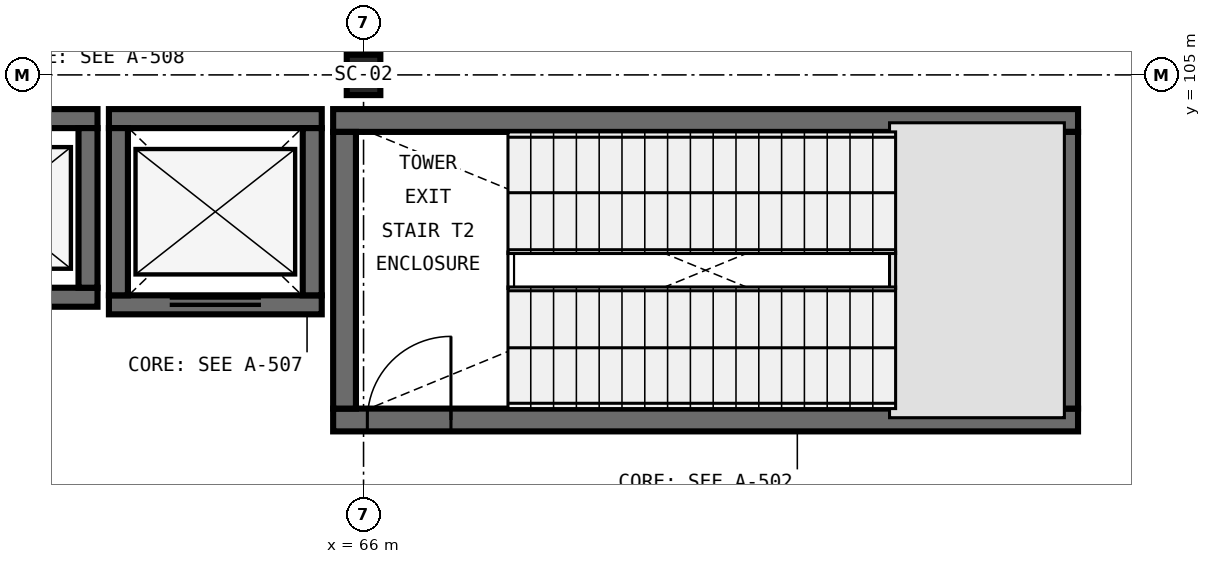
"""IFC4 building model, lengths in metres.
Left out: names, types, materials, properties, quantities, classifications, styles, units other than length and angle.
Written with IfcOpenShell. Run it as: python <this file> out.ifc"""

import sys

from ifc_helpers import new_model, si_unit, direction, frame, frame_2d, origin, origin_2d, place, context, subcontext, project, spatial, rectangle, i_section, extrude, element, fill, save


model = new_model("IFC4")
c1 = context("Model", 3, precision=1e-05, world=origin(), true_north=direction((0.0, 1.0)))
c2 = subcontext(c1, "Body", "Model", "MODEL_VIEW")
j1 = project(units=[si_unit("LENGTHUNIT", "METRE"), si_unit("PLANEANGLEUNIT", "RADIAN")], contexts=[c1])
p1 = place(None, origin())
s1 = spatial("IfcSite", under=j1, at=p1, CompositionType="ELEMENT")
p2 = place(p1, origin())
s2 = spatial("IfcBuilding", under=s1, at=p2, CompositionType="ELEMENT")
p3 = place(p2, frame((0.0, 0.0, 12.0)))
s3 = spatial("IfcBuildingStorey", under=s2, at=p3, CompositionType="ELEMENT", Elevation=12.0)
p4 = place(p3, frame((66.0, 105.0, 0.0), z_axis=(0.0, 0.0, 1.0), x_axis=(1.0, 0.0, 0.0)))
e1 = element("IfcColumn", 1, at=p4, inside=s3, PredefinedType="COLUMN", context=c2, shape_type="SweptSolid", body=[
    extrude(i_section(OverallWidth=0.442, OverallDepth=0.531, WebThickness=0.066, FlangeThickness=0.106, FilletRadius=0.031, at=origin_2d()), origin(), (0.0, 0.0, 1.0), 6.0),
])
p5 = place(p3, frame((65.6, 100.46, 0.0), z_axis=(0.0, 0.0, 1.0), x_axis=(1.0, 0.0, 0.0)))
e2 = element("IfcWall", 2, at=p5, inside=s3, PredefinedType="SHEAR", context=c2, shape_type="SweptSolid", body=[
    extrude(rectangle(XDim=9.8, YDim=0.3, at=frame_2d((4.9, 0.0))), origin(), (0.0, 0.0, 1.0), 6.0),
])
p6 = place(p5, frame((0.45, 0.0, 0.0)))
e3 = element("IfcOpeningElement", 3, at=p6, cuts=e2, PredefinedType="OPENING", context=c2, shape_type="SweptSolid", body=[
    extrude(rectangle(XDim=1.1, YDim=2.2, at=frame_2d((0.55, 1.1))), frame((0.0, 0.165, 0.0), z_axis=(0.0, -1.0, 0.0), x_axis=(1.0, 0.0, 0.0)), (0.0, 0.0, 1.0), 0.33),
])
p7 = place(p3, frame((75.4, 104.4, 0.0), z_axis=(0.0, 0.0, 1.0), x_axis=(-1.0, 0.0, 0.0)))
e4 = element("IfcWall", 4, at=p7, inside=s3, PredefinedType="SHEAR", context=c2, shape_type="SweptSolid", body=[
    extrude(rectangle(XDim=9.8, YDim=0.3, at=frame_2d((4.9, 0.0))), origin(), (0.0, 0.0, 1.0), 6.0),
])
for number, where, z_axis, x_axis in (
    (5, (65.75, 104.25, 0.0), (0.0, 0.0, 1.0), (0.0, -1.0, 0.0)),
    (6, (75.25, 100.61, 0.0), (0.0, 0.0, 1.0), (0.0, 1.0, 0.0)),
):
    element("IfcWall", number, at=place(p3, frame(where, z_axis=z_axis, x_axis=x_axis)), inside=s3, PredefinedType="SHEAR", context=c2, shape_type="SweptSolid", body=[
        extrude(rectangle(XDim=3.64, YDim=0.3, at=frame_2d((1.82, 0.0))), origin(), (0.0, 0.0, 1.0), 6.0),
    ])
p8 = place(p3, frame((62.65, 101.975, 0.0), z_axis=(0.0, 0.0, 1.0), x_axis=(1.0, 0.0, 0.0)))
e7 = element("IfcWall", 7, at=p8, inside=s3, PredefinedType="SHEAR", context=c2, shape_type="SweptSolid", body=[
    extrude(rectangle(XDim=2.8, YDim=0.25, at=frame_2d((1.4, 0.0))), origin(), (0.0, 0.0, 1.0), 6.0),
])
p9 = place(p8, frame((0.8, 0.0, 0.0)))
e8 = element("IfcOpeningElement", 8, at=p9, cuts=e7, PredefinedType="OPENING", context=c2, shape_type="SweptSolid", body=[
    extrude(rectangle(XDim=1.2, YDim=2.2, at=frame_2d((0.6, 1.1))), frame((0.0, 0.14, 0.0), z_axis=(0.0, -1.0, 0.0), x_axis=(1.0, 0.0, 0.0)), (0.0, 0.0, 1.0), 0.28),
])
p10 = place(p3, frame((65.45, 104.425, 0.0), z_axis=(0.0, 0.0, 1.0), x_axis=(-1.0, 0.0, 0.0)))
e9 = element("IfcWall", 9, at=p10, inside=s3, PredefinedType="SHEAR", context=c2, shape_type="SweptSolid", body=[
    extrude(rectangle(XDim=2.8, YDim=0.25, at=frame_2d((1.4, 0.0))), origin(), (0.0, 0.0, 1.0), 6.0),
])
for number, where, z_axis, x_axis in (
    (10, (62.775, 104.3, 0.0), (0.0, 0.0, 1.0), (0.0, -1.0, 0.0)),
    (11, (65.325, 102.1, 0.0), (0.0, 0.0, 1.0), (0.0, 1.0, 0.0)),
):
    element("IfcWall", number, at=place(p3, frame(where, z_axis=z_axis, x_axis=x_axis)), inside=s3, PredefinedType="SHEAR", context=c2, shape_type="SweptSolid", body=[
        extrude(rectangle(XDim=2.2, YDim=0.25, at=frame_2d((1.1, 0.0))), origin(), (0.0, 0.0, 1.0), 6.0),
    ])
p11 = place(p3, frame((59.8, 102.075, 0.0), z_axis=(0.0, 0.0, 1.0), x_axis=(1.0, 0.0, 0.0)))
e12 = element("IfcWall", 12, at=p11, inside=s3, PredefinedType="SHEAR", context=c2, shape_type="SweptSolid", body=[
    extrude(rectangle(XDim=2.7, YDim=0.25, at=frame_2d((1.35, 0.0))), origin(), (0.0, 0.0, 1.0), 6.0),
])
p12 = place(p11, frame((0.8, 0.0, 0.0)))
e13 = element("IfcOpeningElement", 13, at=p12, cuts=e12, PredefinedType="OPENING", context=c2, shape_type="SweptSolid", body=[
    extrude(rectangle(XDim=1.1, YDim=2.2, at=frame_2d((0.55, 1.1))), frame((0.0, 0.14, 0.0), z_axis=(0.0, -1.0, 0.0), x_axis=(1.0, 0.0, 0.0)), (0.0, 0.0, 1.0), 0.28),
])
p13 = place(p3, frame((62.5, 104.425, 0.0), z_axis=(0.0, 0.0, 1.0), x_axis=(-1.0, 0.0, 0.0)))
e14 = element("IfcWall", 14, at=p13, inside=s3, PredefinedType="SHEAR", context=c2, shape_type="SweptSolid", body=[
    extrude(rectangle(XDim=2.7, YDim=0.25, at=frame_2d((1.35, 0.0))), origin(), (0.0, 0.0, 1.0), 6.0),
])
p14 = place(p3, frame((62.375, 102.2, 0.0), z_axis=(0.0, 0.0, 1.0), x_axis=(0.0, 1.0, 0.0)))
e15 = element("IfcWall", 15, at=p14, inside=s3, PredefinedType="SHEAR", context=c2, shape_type="SweptSolid", body=[
    extrude(rectangle(XDim=2.1, YDim=0.25, at=frame_2d((1.05, 0.0))), origin(), (0.0, 0.0, 1.0), 6.0),
])
p15 = place(p6, origin())
e16 = element("IfcDoor", 16, at=p15, inside=s3, OperationType="SINGLE_SWING_RIGHT", PredefinedType="DOOR", context=c2, shape_type="SweptSolid", body=[
    extrude(rectangle(XDim=1.1, YDim=2.2, at=frame_2d((0.55, 1.1))), frame((0.0, 0.025, 0.0), z_axis=(0.0, -1.0, 0.0), x_axis=(1.0, 0.0, 0.0)), (0.0, 0.0, 1.0), 0.05),
])
fill(e3, e16)
p16 = place(p9, origin())
e17 = element("IfcDoor", 17, at=p16, inside=s3, OperationType="DOUBLE_DOOR_SLIDING", PredefinedType="DOOR", context=c2, shape_type="SweptSolid", body=[
    extrude(rectangle(XDim=1.2, YDim=2.2, at=frame_2d((0.6, 1.1))), frame((0.0, 0.025, 0.0), z_axis=(0.0, -1.0, 0.0), x_axis=(1.0, 0.0, 0.0)), (0.0, 0.0, 1.0), 0.05),
])
fill(e8, e17)
save(model, sys.argv[1])
